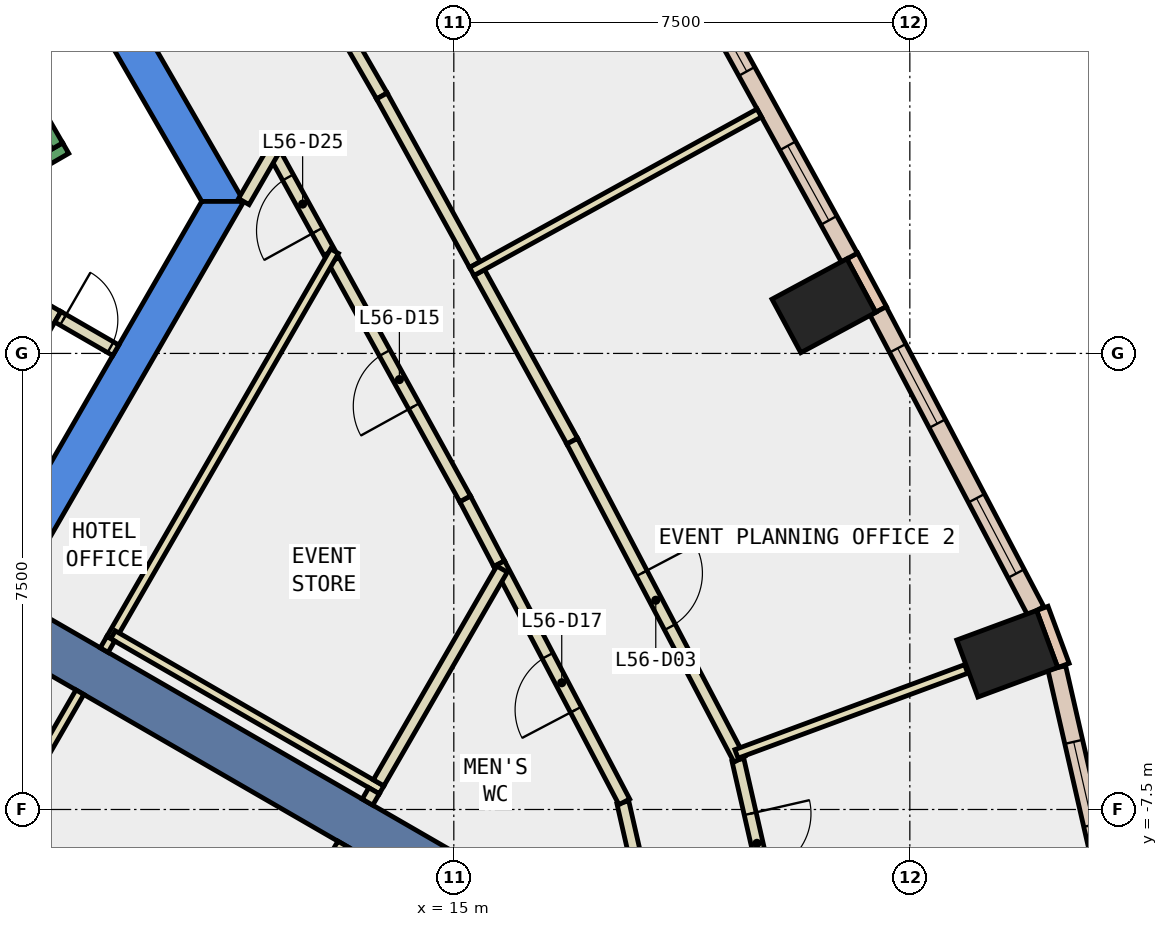
"""IFC4 building model, lengths in metres.
Left out: names, types, materials, properties, quantities, classifications, styles, units other than length and angle.
Written with IfcOpenShell. Run it as: python <this file> out.ifc"""

import sys

from ifc_helpers import new_model, si_unit, direction, frame, frame_2d, origin, origin_2d, place, context, subcontext, project, spatial, polyline, rectangle, outline, extrude, element, fill, save


model = new_model("IFC4")
c1 = context("Model", 3, precision=1e-05, world=origin(), true_north=direction((0.0, 1.0)))
c2 = subcontext(c1, "Body", "Model", "MODEL_VIEW")
j1 = project(units=[si_unit("LENGTHUNIT", "METRE"), si_unit("PLANEANGLEUNIT", "RADIAN")], contexts=[c1])
p1 = place(None, origin())
s1 = spatial("IfcSite", under=j1, at=p1, CompositionType="ELEMENT")
p2 = place(p1, origin())
s2 = spatial("IfcBuilding", under=s1, at=p2, CompositionType="ELEMENT")
p3 = place(p2, frame((0.0, 0.0, 248.6)))
s3 = spatial("IfcBuildingStorey", under=s2, at=p3, CompositionType="ELEMENT", Elevation=248.6)
for number, where, z_axis, x_axis in (
    (1, (24.102, -4.939, -0.34), (0.0, 0.0, 1.0), (-0.347, 0.938, 0.0)),
    (2, (21.086, 0.784, -0.34), (0.0, 0.0, 1.0), (-0.474, 0.881, 0.0)),
):
    element("IfcColumn", number, at=place(p3, frame(where, z_axis=z_axis, x_axis=x_axis)), inside=s3, PredefinedType="COLUMN", context=c2, shape_type="SweptSolid", body=[
        extrude(rectangle(XDim=1.0, YDim=1.4, at=origin_2d()), origin(), (0.0, 0.0, 1.0), 3.6),
    ])
p4 = place(p3, frame((0.0, 0.0, -0.34)))
e3 = element("IfcWall", 3, at=p4, inside=s3, PredefinedType="SHEAR", context=c2, shape_type="SweptSolid", body=[
    extrude(outline(polyline([(6.786, 10.747), (6.266, 10.447), (10.854, 2.5), (11.547, 2.5), (6.786, 10.747)])), origin(), (0.0, 0.0, 1.0), 3.6),
])
p5 = place(p3, frame((0.0, 0.0, -0.34)))
e4 = element("IfcWall", 4, at=p5, inside=s3, PredefinedType="SHEAR", context=c2, shape_type="SweptSolid", body=[
    extrude(outline(polyline([(5.774, -7.5), (11.547, 2.5), (10.854, 2.5), (5.427, -6.9), (5.774, -7.5)])), origin(), (0.0, 0.0, 1.0), 3.6),
])
p6 = place(p3, frame((7.578, -4.375, -0.34), z_axis=(0.0, 0.0, 1.0), x_axis=(0.866024315419, -0.5000018851, 0.0)))
e5 = element("IfcWall", 5, at=p6, inside=s3, PredefinedType="SHEAR", context=c2, shape_type="SweptSolid", body=[
    extrude(rectangle(XDim=9.0, YDim=0.8, at=frame_2d((4.5, 0.0))), origin(), (0.0, 0.0, 1.0), 3.6),
])
p7 = place(p3, frame((25.026, -5.131, 0.0), z_axis=(0.0, 0.0, 1.0), x_axis=(-0.346892928577, 0.937904737222, 0.0)))
e6 = element("IfcWall", 6, at=p7, inside=s3, PredefinedType="STANDARD", context=c2, shape_type="SweptSolid", body=[
    extrude(rectangle(XDim=1.0, YDim=0.2, at=frame_2d((0.5, 0.0))), origin(), (0.0, 0.0, 1.0), 3.26),
])
p8 = place(p3, frame((22.027, 0.723, 0.0), z_axis=(0.0, 0.0, 1.0), x_axis=(-0.473852444207, 0.880604259085, 0.0)))
e7 = element("IfcWall", 7, at=p8, inside=s3, PredefinedType="STANDARD", context=c2, shape_type="SweptSolid", body=[
    extrude(rectangle(XDim=1.0, YDim=0.2, at=frame_2d((0.5, 0.0))), origin(), (0.0, 0.0, 1.0), 3.26),
])
p9 = place(p3, frame((25.785, -8.97, 0.0), z_axis=(0.0, 0.0, 1.0), x_axis=(-0.222901327396, 0.974841011778, 0.0)))
e8 = element("IfcWall", 8, at=p9, inside=s3, PredefinedType="STANDARD", context=c2, shape_type="SweptSolid", body=[
    extrude(rectangle(XDim=3.898, YDim=0.3, at=frame_2d((1.949, 0.0))), origin(), (0.0, 0.0, 1.0), 3.26),
])
p10 = place(p9, frame((1.249, 0.0, 0.9)))
e9 = element("IfcOpeningElement", 9, at=p10, cuts=e8, PredefinedType="OPENING", context=c2, shape_type="SweptSolid", body=[
    extrude(rectangle(XDim=1.4, YDim=2.0, at=frame_2d((0.7, 1.0))), frame((0.0, 0.16, 0.0), z_axis=(0.0, -1.0, 0.0), x_axis=(1.0, 0.0, 0.0)), (0.0, 0.0, 1.0), 0.32),
])
p11 = place(p3, frame((24.57, -4.234, 0.0), z_axis=(0.0, 0.0, 1.0), x_axis=(-0.465228032148, 0.885190871001, 0.0)))
e10 = element("IfcWall", 10, at=p11, inside=s3, PredefinedType="STANDARD", context=c2, shape_type="SweptSolid", body=[
    extrude(rectangle(XDim=5.572, YDim=0.3, at=frame_2d((2.786, 0.0))), origin(), (0.0, 0.0, 1.0), 3.26),
])
p12 = place(p11, frame((0.693, 0.0, 0.9)))
e11 = element("IfcOpeningElement", 11, at=p12, cuts=e10, PredefinedType="OPENING", context=c2, shape_type="SweptSolid", body=[
    extrude(rectangle(XDim=1.4, YDim=2.0, at=frame_2d((0.7, 1.0))), frame((0.0, 0.16, 0.0), z_axis=(0.0, -1.0, 0.0), x_axis=(1.0, 0.0, 0.0)), (0.0, 0.0, 1.0), 0.32),
])
p13 = place(p11, frame((3.479, 0.0, 0.9)))
e12 = element("IfcOpeningElement", 12, at=p13, cuts=e10, PredefinedType="OPENING", context=c2, shape_type="SweptSolid", body=[
    extrude(rectangle(XDim=1.4, YDim=2.0, at=frame_2d((0.7, 1.0))), frame((0.0, 0.16, 0.0), z_axis=(0.0, -1.0, 0.0), x_axis=(1.0, 0.0, 0.0)), (0.0, 0.0, 1.0), 0.32),
])
p14 = place(p3, frame((21.505, 1.577, 0.0), z_axis=(0.0, 0.0, 1.0), x_axis=(-0.482734585173, 0.875766704253, 0.0)))
e13 = element("IfcWall", 13, at=p14, inside=s3, PredefinedType="STANDARD", context=c2, shape_type="SweptSolid", body=[
    extrude(rectangle(XDim=5.593, YDim=0.3, at=frame_2d((2.796, 0.0))), origin(), (0.0, 0.0, 1.0), 3.26),
])
p15 = place(p14, frame((0.698, 0.0, 0.9)))
e14 = element("IfcOpeningElement", 14, at=p15, cuts=e13, PredefinedType="OPENING", context=c2, shape_type="SweptSolid", body=[
    extrude(rectangle(XDim=1.4, YDim=2.0, at=frame_2d((0.7, 1.0))), frame((0.0, 0.16, 0.0), z_axis=(0.0, -1.0, 0.0), x_axis=(1.0, 0.0, 0.0)), (0.0, 0.0, 1.0), 0.32),
])
p16 = place(p14, frame((3.495, 0.0, 0.9)))
e15 = element("IfcOpeningElement", 15, at=p16, cuts=e13, PredefinedType="OPENING", context=c2, shape_type="SweptSolid", body=[
    extrude(rectangle(XDim=1.4, YDim=2.0, at=frame_2d((0.7, 1.0))), frame((0.0, 0.16, 0.0), z_axis=(0.0, -1.0, 0.0), x_axis=(1.0, 0.0, 0.0)), (0.0, 0.0, 1.0), 0.32),
])
p17 = place(p3, frame((12.952, 1.661, 0.0), z_axis=(0.0, 0.0, 1.0), x_axis=(-0.482707835392, 0.875781448566, 0.0)))
e16 = element("IfcWall", 16, at=p17, inside=s3, PredefinedType="PARTITIONING", context=c2, shape_type="SweptSolid", body=[
    extrude(rectangle(XDim=1.817, YDim=0.2, at=frame_2d((0.908, 0.0))), origin(), (0.0, 0.0, 1.0), 3.26),
])
p18 = place(p17, frame((0.408, 0.0, 0.0)))
e17 = element("IfcOpeningElement", 17, at=p18, cuts=e16, PredefinedType="OPENING", context=c2, shape_type="SweptSolid", body=[
    extrude(rectangle(XDim=1.0, YDim=2.1, at=frame_2d((0.5, 1.05))), frame((0.0, 0.11, 0.0), z_axis=(0.0, -1.0, 0.0), x_axis=(1.0, 0.0, 0.0)), (0.0, 0.0, 1.0), 0.22),
])
p19 = place(p3, frame((12.079, 3.419, 0.0), z_axis=(0.0, 0.0, 1.0), x_axis=(-0.500674759037, -0.865635480825, 0.0)))
e18 = element("IfcWall", 18, at=p19, inside=s3, PredefinedType="PARTITIONING", context=c2, shape_type="SweptSolid", body=[
    extrude(rectangle(XDim=1.065, YDim=0.2, at=frame_2d((0.532, 0.0))), origin(), (0.0, 0.0, 1.0), 3.26),
])
p20 = place(p3, frame((15.746, -3.458, 0.0), z_axis=(0.0, 0.0, 1.0), x_axis=(-0.464794189951, 0.885418748948, 0.0)))
e19 = element("IfcWall", 19, at=p20, inside=s3, PredefinedType="PARTITIONING", context=c2, shape_type="SweptSolid", body=[
    extrude(rectangle(XDim=1.205, YDim=0.2, at=frame_2d((0.603, 0.0))), origin(), (0.0, 0.0, 1.0), 3.26),
])
p21 = place(p3, frame((15.186, -2.391, 0.0), z_axis=(0.0, 0.0, 1.0), x_axis=(-0.482858240592, 0.875698532311, 0.0)))
e20 = element("IfcWall", 20, at=p21, inside=s3, PredefinedType="PARTITIONING", context=c2, shape_type="SweptSolid", body=[
    extrude(rectangle(XDim=4.478, YDim=0.2, at=frame_2d((2.239, 0.0))), origin(), (0.0, 0.0, 1.0), 3.26),
])
p22 = place(p21, frame((1.739, 0.0, 0.0)))
e21 = element("IfcOpeningElement", 21, at=p22, cuts=e20, PredefinedType="OPENING", context=c2, shape_type="SweptSolid", body=[
    extrude(rectangle(XDim=1.0, YDim=2.1, at=frame_2d((0.5, 1.05))), frame((0.0, 0.11, 0.0), z_axis=(0.0, -1.0, 0.0), x_axis=(1.0, 0.0, 0.0)), (0.0, 0.0, 1.0), 0.22),
])
p23 = place(p3, frame((18.236, -9.379, 0.0), z_axis=(0.0, 0.0, 1.0), x_axis=(-0.222760041204, 0.974873306662, 0.0)))
e22 = element("IfcWall", 22, at=p23, inside=s3, PredefinedType="PARTITIONING", context=c2, shape_type="SweptSolid", body=[
    extrude(rectangle(XDim=2.047, YDim=0.2, at=frame_2d((1.024, 0.0))), origin(), (0.0, 0.0, 1.0), 3.26),
])
p24 = place(p3, frame((17.804, -7.374, 0.0), z_axis=(0.0, 0.0, 1.0), x_axis=(-0.465179971699, 0.885216128372, 0.0)))
e23 = element("IfcWall", 23, at=p24, inside=s3, PredefinedType="PARTITIONING", context=c2, shape_type="SweptSolid", body=[
    extrude(rectangle(XDim=4.424, YDim=0.2, at=frame_2d((2.212, 0.0))), origin(), (0.0, 0.0, 1.0), 3.26),
])
p25 = place(p24, frame((1.712, 0.0, 0.0)))
e24 = element("IfcOpeningElement", 24, at=p25, cuts=e23, PredefinedType="OPENING", context=c2, shape_type="SweptSolid", body=[
    extrude(rectangle(XDim=1.0, YDim=2.1, at=frame_2d((0.5, 1.05))), frame((0.0, 0.11, 0.0), z_axis=(0.0, -1.0, 0.0), x_axis=(1.0, 0.0, 0.0)), (0.0, 0.0, 1.0), 0.22),
])
p26 = place(p3, frame((19.672, -6.683, 0.0), z_axis=(0.0, 0.0, 1.0), x_axis=(0.222523624687, -0.974927298036, 0.0)))
e25 = element("IfcWall", 25, at=p26, inside=s3, PredefinedType="PARTITIONING", context=c2, shape_type="SweptSolid", body=[
    extrude(rectangle(XDim=2.817, YDim=0.2, at=frame_2d((1.409, 0.0))), origin(), (0.0, 0.0, 1.0), 3.26),
])
p27 = place(p26, frame((0.909, 0.0, 0.0)))
e26 = element("IfcOpeningElement", 26, at=p27, cuts=e25, PredefinedType="OPENING", context=c2, shape_type="SweptSolid", body=[
    extrude(rectangle(XDim=1.0, YDim=2.1, at=frame_2d((0.5, 1.05))), frame((0.0, 0.11, 0.0), z_axis=(0.0, -1.0, 0.0), x_axis=(1.0, 0.0, 0.0)), (0.0, 0.0, 1.0), 0.22),
])
p28 = place(p3, frame((15.418, 1.33, 0.0), z_axis=(0.0, 0.0, 1.0), x_axis=(0.482838875149, -0.875709210095, 0.0)))
e27 = element("IfcWall", 27, at=p28, inside=s3, PredefinedType="PARTITIONING", context=c2, shape_type="SweptSolid", body=[
    extrude(rectangle(XDim=3.167, YDim=0.2, at=frame_2d((1.583, 0.0))), origin(), (0.0, 0.0, 1.0), 3.26),
])
p29 = place(p3, frame((16.947, -1.443, 0.0), z_axis=(0.0, 0.0, 1.0), x_axis=(0.465133414481, -0.88524059257, 0.0)))
e28 = element("IfcWall", 28, at=p29, inside=s3, PredefinedType="PARTITIONING", context=c2, shape_type="SweptSolid", body=[
    extrude(rectangle(XDim=5.91, YDim=0.2, at=frame_2d((2.955, 0.0))), origin(), (0.0, 0.0, 1.0), 3.26),
])
p30 = place(p29, frame((2.455, 0.0, 0.0)))
e29 = element("IfcOpeningElement", 29, at=p30, cuts=e28, PredefinedType="OPENING", context=c2, shape_type="SweptSolid", body=[
    extrude(rectangle(XDim=1.0, YDim=2.1, at=frame_2d((0.5, 1.05))), frame((0.0, 0.11, 0.0), z_axis=(0.0, -1.0, 0.0), x_axis=(1.0, 0.0, 0.0)), (0.0, 0.0, 1.0), 0.22),
])
p31 = place(p3, frame((12.234, 6.977, 0.0), z_axis=(0.0, 0.0, 1.0), x_axis=(0.499820325382, -0.866129114125, 0.0)))
e30 = element("IfcWall", 30, at=p31, inside=s3, PredefinedType="PARTITIONING", context=c2, shape_type="SweptSolid", body=[
    extrude(rectangle(XDim=3.167, YDim=0.2, at=frame_2d((1.583, 0.0))), origin(), (0.0, 0.0, 1.0), 3.26),
])
p32 = place(p31, frame((1.084, 0.0, 0.0)))
e31 = element("IfcOpeningElement", 31, at=p32, cuts=e30, PredefinedType="OPENING", context=c2, shape_type="SweptSolid", body=[
    extrude(rectangle(XDim=1.0, YDim=2.1, at=frame_2d((0.5, 1.05))), frame((0.0, 0.11, 0.0), z_axis=(0.0, -1.0, 0.0), x_axis=(1.0, 0.0, 0.0)), (0.0, 0.0, 1.0), 0.22),
])
p33 = place(p3, frame((13.817, 4.234, 0.0), z_axis=(0.0, 0.0, 1.0), x_axis=(0.482871474341, -0.875691235121, 0.0)))
e32 = element("IfcWall", 32, at=p33, inside=s3, PredefinedType="PARTITIONING", context=c2, shape_type="SweptSolid", body=[
    extrude(rectangle(XDim=3.167, YDim=0.2, at=frame_2d((1.583, 0.0))), origin(), (0.0, 0.0, 1.0), 3.26),
])
p34 = place(p3, frame((5.751, -3.938, 0.0), z_axis=(0.0, 0.0, 1.0), x_axis=(0.500034260056, 0.866005622828, 0.0)))
e33 = element("IfcWall", 33, at=p34, inside=s3, PredefinedType="PARTITIONING", context=c2, shape_type="SweptSolid", body=[
    extrude(rectangle(XDim=5.399, YDim=0.2, at=frame_2d((2.7, 0.0))), origin(), (0.0, 0.0, 1.0), 3.26),
])
p35 = place(p3, frame((8.488, 0.602, 0.0), z_axis=(0.0, 0.0, 1.0), x_axis=(0.866063652425, -0.499933745558, 0.0)))
e34 = element("IfcWall", 34, at=p35, inside=s3, PredefinedType="PARTITIONING", context=c2, shape_type="SweptSolid", body=[
    extrude(rectangle(XDim=1.1, YDim=0.2, at=frame_2d((0.55, 0.0))), origin(), (0.0, 0.0, 1.0), 3.26),
])
p36 = place(p35, frame((0.1, 0.0, 0.0)))
e35 = element("IfcOpeningElement", 35, at=p36, cuts=e34, PredefinedType="OPENING", context=c2, shape_type="SweptSolid", body=[
    extrude(rectangle(XDim=0.9, YDim=2.1, at=frame_2d((0.45, 1.05))), frame((0.0, 0.11, 0.0), z_axis=(0.0, -1.0, 0.0), x_axis=(1.0, 0.0, 0.0)), (0.0, 0.0, 1.0), 0.22),
])
p37 = place(p3, frame((7.8, -7.39, 0.0), z_axis=(0.0, 0.0, 1.0), x_axis=(0.499977374825, 0.866038466041, 0.0)))
e36 = element("IfcWall", 36, at=p37, inside=s3, PredefinedType="PARTITIONING", context=c2, shape_type="SweptSolid", body=[
    extrude(rectangle(XDim=2.1, YDim=0.15, at=frame_2d((1.05, 0.0))), origin(), (0.0, 0.0, 1.0), 3.26),
])
p38 = place(p3, frame((9.358, -4.692, 0.0), z_axis=(0.0, 0.0, 1.0), x_axis=(0.500027777314, 0.866009365951, 0.0)))
e37 = element("IfcWall", 37, at=p38, inside=s3, PredefinedType="PARTITIONING", context=c2, shape_type="SweptSolid", body=[
    extrude(rectangle(XDim=7.36, YDim=0.15, at=frame_2d((3.68, 0.0))), origin(), (0.0, 0.0, 1.0), 3.26),
])
p39 = place(p3, frame((9.395, -4.627, 0.0), z_axis=(0.0, 0.0, 1.0), x_axis=(0.866034131428, -0.499984882974, 0.0)))
e38 = element("IfcWall", 38, at=p39, inside=s3, PredefinedType="PARTITIONING", context=c2, shape_type="SweptSolid", body=[
    extrude(rectangle(XDim=5.1, YDim=0.15, at=frame_2d((2.55, 0.0))), origin(), (0.0, 0.0, 1.0), 3.26),
])
p40 = place(p3, frame((13.18, -8.071, 0.0), z_axis=(0.0, 0.0, 1.0), x_axis=(-0.499914724673, -0.86607463192, 0.0)))
e39 = element("IfcWall", 39, at=p40, inside=s3, PredefinedType="PARTITIONING", context=c2, shape_type="SweptSolid", body=[
    extrude(rectangle(XDim=4.507, YDim=0.2, at=frame_2d((2.253, 0.0))), origin(), (0.0, 0.0, 1.0), 3.26),
])
p41 = place(p3, frame((13.688, -7.192, 0.0), z_axis=(0.0, 0.0, 1.0), x_axis=(-0.499787711288, -0.866147934042, 0.0)))
e40 = element("IfcWall", 40, at=p41, inside=s3, PredefinedType="PARTITIONING", context=c2, shape_type="SweptSolid", body=[
    extrude(rectangle(XDim=0.216, YDim=0.2, at=frame_2d((0.108, 0.0))), origin(), (0.0, 0.0, 1.0), 3.26),
])
p42 = place(p3, frame((15.793, -3.546, 0.0), z_axis=(0.0, 0.0, 1.0), x_axis=(-0.500000064182, -0.866025366729, 0.0)))
e41 = element("IfcWall", 41, at=p42, inside=s3, PredefinedType="PARTITIONING", context=c2, shape_type="SweptSolid", body=[
    extrude(rectangle(XDim=4.06, YDim=0.2, at=frame_2d((2.03, 0.0))), origin(), (0.0, 0.0, 1.0), 3.26),
])
p43 = place(p3, frame((19.649, -6.586, 0.0), z_axis=(0.0, 0.0, 1.0), x_axis=(0.937935790958, 0.346808956114, 0.0)))
e42 = element("IfcWall", 42, at=p43, inside=s3, PredefinedType="PARTITIONING", context=c2, shape_type="SweptSolid", body=[
    extrude(rectangle(XDim=4.028, YDim=0.15, at=frame_2d((2.014, 0.0))), origin(), (0.0, 0.0, 1.0), 3.26),
])
p44 = place(p3, frame((15.295, 1.347, 0.0), z_axis=(0.0, 0.0, 1.0), x_axis=(0.875728645362, 0.482803624358, 0.0)))
e43 = element("IfcWall", 43, at=p44, inside=s3, PredefinedType="PARTITIONING", context=c2, shape_type="SweptSolid", body=[
    extrude(rectangle(XDim=5.4, YDim=0.15, at=frame_2d((2.7, 0.0))), origin(), (0.0, 0.0, 1.0), 3.26),
])
p45 = place(p3, frame((9.25, -4.879, 0.0), z_axis=(0.0, 0.0, 1.0), x_axis=(0.499787711288, 0.866147934042, 0.0)))
e44 = element("IfcWall", 44, at=p45, inside=s3, PredefinedType="PARTITIONING", context=c2, shape_type="SweptSolid", body=[
    extrude(rectangle(XDim=0.216, YDim=0.15, at=frame_2d((0.108, 0.0))), origin(), (0.0, 0.0, 1.0), 3.26),
])
p46 = place(p3, frame((4.806, 1.176, 0.0), z_axis=(0.0, 0.0, 1.0), x_axis=(0.866059941101, 0.499940174841, 0.0)))
e45 = element("IfcWall", 45, at=p46, inside=s3, PredefinedType="STANDARD", context=c2, shape_type="SweptSolid", body=[
    extrude(rectangle(XDim=4.4, YDim=0.2, at=frame_2d((2.2, 0.0))), origin(), (0.0, 0.0, 1.0), 3.26),
])
p47 = place(p46, frame((2.4, 0.0, 0.0)))
e46 = element("IfcOpeningElement", 46, at=p47, cuts=e45, PredefinedType="OPENING", context=c2, shape_type="SweptSolid", body=[
    extrude(rectangle(XDim=1.1, YDim=2.2, at=frame_2d((0.55, 1.1))), frame((0.0, 0.11, 0.0), z_axis=(0.0, -1.0, 0.0), x_axis=(1.0, 0.0, 0.0)), (0.0, 0.0, 1.0), 0.22),
])
p48 = place(p3, frame((8.48, 3.412, 0.0), z_axis=(0.0, 0.0, 1.0), x_axis=(-0.499978703459, 0.866037698999, 0.0)))
e47 = element("IfcWall", 47, at=p48, inside=s3, PredefinedType="STANDARD", context=c2, shape_type="SweptSolid", body=[
    extrude(rectangle(XDim=6.9, YDim=0.2, at=frame_2d((3.45, 0.0))), origin(), (0.0, 0.0, 1.0), 3.26),
])
p49 = place(p10, origin())
e48 = element("IfcWindow", 48, at=p49, inside=s3, PartitioningType="SINGLE_PANEL", PredefinedType="WINDOW", context=c2, shape_type="SweptSolid", body=[
    extrude(rectangle(XDim=1.4, YDim=2.0, at=frame_2d((0.7, 1.0))), frame((0.0, 0.03, 0.0), z_axis=(0.0, -1.0, 0.0), x_axis=(1.0, 0.0, 0.0)), (0.0, 0.0, 1.0), 0.06),
])
fill(e9, e48)
p50 = place(p12, origin())
e49 = element("IfcWindow", 49, at=p50, inside=s3, PartitioningType="SINGLE_PANEL", PredefinedType="WINDOW", context=c2, shape_type="SweptSolid", body=[
    extrude(rectangle(XDim=1.4, YDim=2.0, at=frame_2d((0.7, 1.0))), frame((0.0, 0.03, 0.0), z_axis=(0.0, -1.0, 0.0), x_axis=(1.0, 0.0, 0.0)), (0.0, 0.0, 1.0), 0.06),
])
fill(e11, e49)
p51 = place(p13, origin())
e50 = element("IfcWindow", 50, at=p51, inside=s3, PartitioningType="SINGLE_PANEL", PredefinedType="WINDOW", context=c2, shape_type="SweptSolid", body=[
    extrude(rectangle(XDim=1.4, YDim=2.0, at=frame_2d((0.7, 1.0))), frame((0.0, 0.03, 0.0), z_axis=(0.0, -1.0, 0.0), x_axis=(1.0, 0.0, 0.0)), (0.0, 0.0, 1.0), 0.06),
])
fill(e12, e50)
p52 = place(p15, origin())
e51 = element("IfcWindow", 51, at=p52, inside=s3, PartitioningType="SINGLE_PANEL", PredefinedType="WINDOW", context=c2, shape_type="SweptSolid", body=[
    extrude(rectangle(XDim=1.4, YDim=2.0, at=frame_2d((0.7, 1.0))), frame((0.0, 0.03, 0.0), z_axis=(0.0, -1.0, 0.0), x_axis=(1.0, 0.0, 0.0)), (0.0, 0.0, 1.0), 0.06),
])
fill(e14, e51)
p53 = place(p16, origin())
e52 = element("IfcWindow", 52, at=p53, inside=s3, PartitioningType="SINGLE_PANEL", PredefinedType="WINDOW", context=c2, shape_type="SweptSolid", body=[
    extrude(rectangle(XDim=1.4, YDim=2.0, at=frame_2d((0.7, 1.0))), frame((0.0, 0.03, 0.0), z_axis=(0.0, -1.0, 0.0), x_axis=(1.0, 0.0, 0.0)), (0.0, 0.0, 1.0), 0.06),
])
fill(e15, e52)
p54 = place(p27, origin())
e53 = element("IfcDoor", 53, at=p54, inside=s3, OperationType="SINGLE_SWING_LEFT", PredefinedType="DOOR", context=c2, shape_type="SweptSolid", body=[
    extrude(rectangle(XDim=1.0, YDim=2.1, at=frame_2d((0.5, 1.05))), frame((0.0, 0.025, 0.0), z_axis=(0.0, -1.0, 0.0), x_axis=(1.0, 0.0, 0.0)), (0.0, 0.0, 1.0), 0.05),
])
fill(e26, e53)
p55 = place(p30, origin())
e54 = element("IfcDoor", 54, at=p55, inside=s3, OperationType="SINGLE_SWING_LEFT", PredefinedType="DOOR", context=c2, shape_type="SweptSolid", body=[
    extrude(rectangle(XDim=1.0, YDim=2.1, at=frame_2d((0.5, 1.05))), frame((0.0, 0.025, 0.0), z_axis=(0.0, -1.0, 0.0), x_axis=(1.0, 0.0, 0.0)), (0.0, 0.0, 1.0), 0.05),
])
fill(e29, e54)
p56 = place(p22, origin())
e55 = element("IfcDoor", 55, at=p56, inside=s3, OperationType="SINGLE_SWING_LEFT", PredefinedType="DOOR", context=c2, shape_type="SweptSolid", body=[
    extrude(rectangle(XDim=1.0, YDim=2.1, at=frame_2d((0.5, 1.05))), frame((0.0, 0.025, 0.0), z_axis=(0.0, -1.0, 0.0), x_axis=(1.0, 0.0, 0.0)), (0.0, 0.0, 1.0), 0.05),
])
fill(e21, e55)
p57 = place(p25, origin())
e56 = element("IfcDoor", 56, at=p57, inside=s3, OperationType="SINGLE_SWING_LEFT", PredefinedType="DOOR", context=c2, shape_type="SweptSolid", body=[
    extrude(rectangle(XDim=1.0, YDim=2.1, at=frame_2d((0.5, 1.05))), frame((0.0, 0.025, 0.0), z_axis=(0.0, -1.0, 0.0), x_axis=(1.0, 0.0, 0.0)), (0.0, 0.0, 1.0), 0.05),
])
fill(e24, e56)
p58 = place(p18, origin())
e57 = element("IfcDoor", 57, at=p58, inside=s3, OperationType="SINGLE_SWING_RIGHT", PredefinedType="DOOR", context=c2, shape_type="SweptSolid", body=[
    extrude(rectangle(XDim=1.0, YDim=2.1, at=frame_2d((0.5, 1.05))), frame((0.0, 0.025, 0.0), z_axis=(0.0, -1.0, 0.0), x_axis=(1.0, 0.0, 0.0)), (0.0, 0.0, 1.0), 0.05),
])
fill(e17, e57)
p59 = place(p36, origin())
e58 = element("IfcDoor", 58, at=p59, inside=s3, OperationType="SINGLE_SWING_RIGHT", PredefinedType="DOOR", context=c2, shape_type="SweptSolid", body=[
    extrude(rectangle(XDim=0.9, YDim=2.1, at=frame_2d((0.45, 1.05))), frame((0.0, 0.025, 0.0), z_axis=(0.0, -1.0, 0.0), x_axis=(1.0, 0.0, 0.0)), (0.0, 0.0, 1.0), 0.05),
])
fill(e35, e58)
save(model, sys.argv[1])
